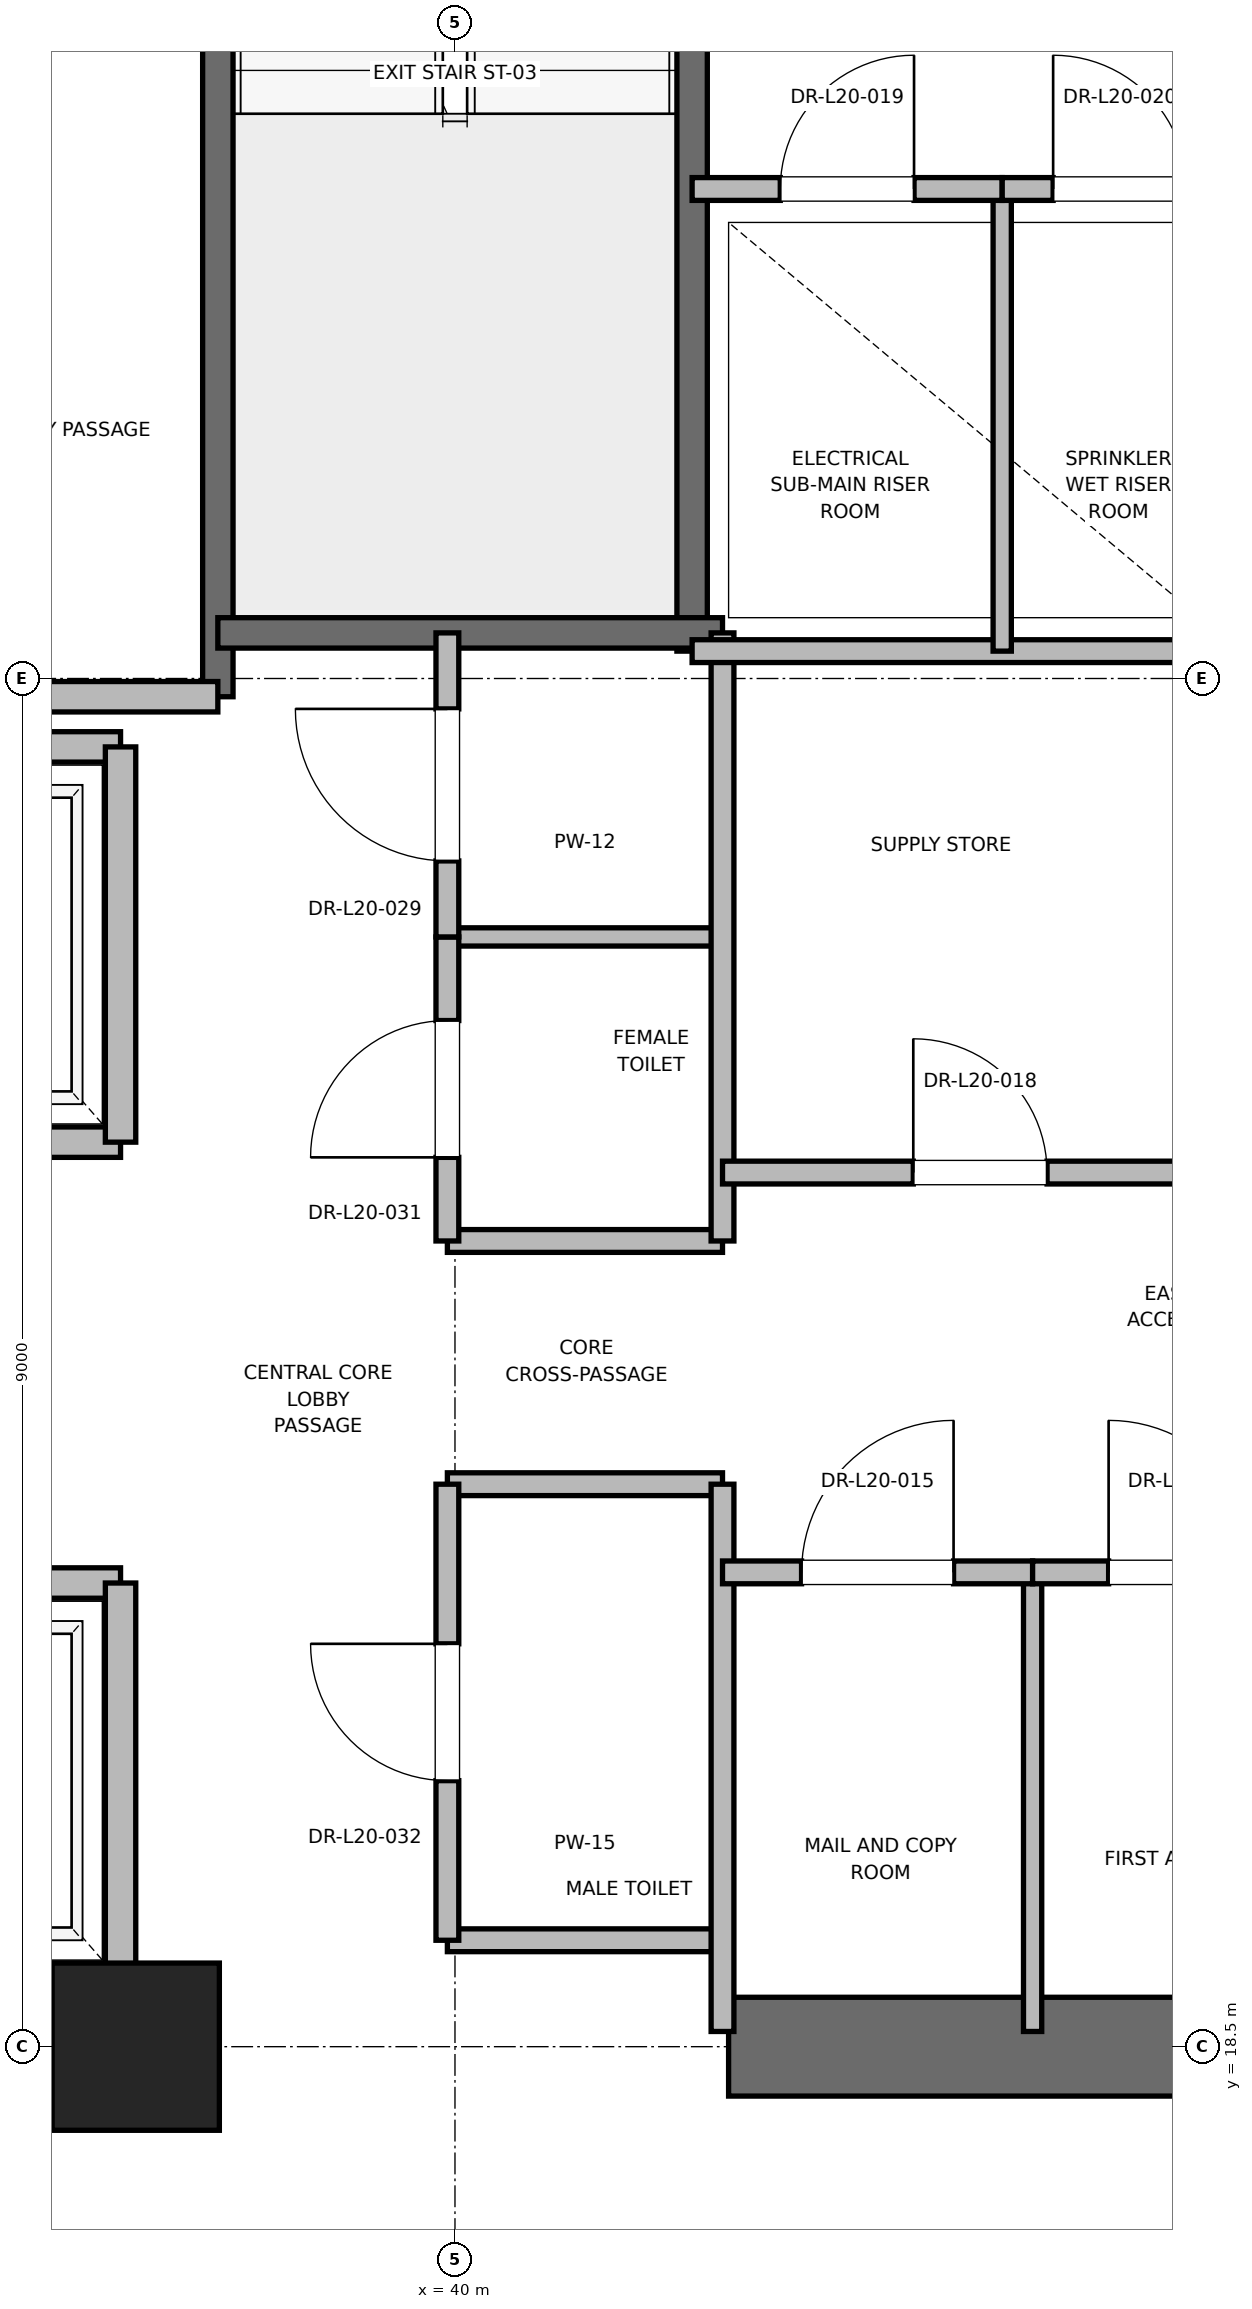
"""IFC4 building model, lengths in metres.
Left out: names, types, materials, properties, quantities, classifications, styles, units other than length and angle.
Written with IfcOpenShell. Run it as: python <this file> out.ifc"""

import sys

from ifc_helpers import new_model, si_unit, direction, frame, frame_2d, origin, origin_2d, place, context, subcontext, project, spatial, rectangle, extrude, element, fill, save


model = new_model("IFC4")
c1 = context("Model", 3, precision=1e-05, world=origin(), true_north=direction((0.0, 1.0)))
c2 = subcontext(c1, "Body", "Model", "MODEL_VIEW")
j1 = project(units=[si_unit("LENGTHUNIT", "METRE"), si_unit("PLANEANGLEUNIT", "RADIAN")], contexts=[c1])
p1 = place(None, origin())
s1 = spatial("IfcSite", under=j1, at=p1, CompositionType="ELEMENT")
p2 = place(p1, origin())
s2 = spatial("IfcBuilding", under=s1, at=p2, CompositionType="ELEMENT")
p3 = place(p2, frame((0.0, 0.0, 87.6)))
s3 = spatial("IfcBuildingStorey", under=s2, at=p3, CompositionType="ELEMENT", Elevation=87.6)
p4 = place(p3, frame((37.9, 18.5, 0.0), z_axis=(0.0, 0.0, 1.0), x_axis=(1.0, 0.0, 0.0)))
e1 = element("IfcColumn", 1, at=p4, inside=s3, PredefinedType="PILASTER", context=c2, shape_type="SweptSolid", body=[
    extrude(rectangle(XDim=1.1, YDim=1.1, at=origin_2d()), origin(), (0.0, 0.0, 1.0), 4.0),
])
for number, where, z_axis, x_axis in (
    (2, (29.0, 18.5, 0.0), (0.0, 0.0, 1.0), (1.0, 0.0, 0.0)),
    (3, (41.8, 18.5, 0.0), (0.0, 0.0, 1.0), (1.0, 0.0, 0.0)),
):
    element("IfcWall", number, at=place(p3, frame(where, z_axis=z_axis, x_axis=x_axis)), inside=s3, PredefinedType="SHEAR", context=c2, shape_type="SweptSolid", body=[
        extrude(rectangle(XDim=9.2, YDim=0.65, at=frame_2d((4.6, 0.0))), origin(), (0.0, 0.0, 1.0), 3.76),
    ])
p5 = place(p3, frame((38.44, 27.38, 0.0), z_axis=(0.0, 0.0, 1.0), x_axis=(0.0, 1.0, 0.0)))
e4 = element("IfcWall", 4, at=p5, inside=s3, PredefinedType="SOLIDWALL", context=c2, shape_type="SweptSolid", body=[
    extrude(rectangle(XDim=8.87, YDim=0.2, at=frame_2d((4.435, 0.0))), origin(), (0.0, 0.0, 1.0), 3.76),
])
p6 = place(p3, frame((41.56, 27.68, 0.0), z_axis=(0.0, 0.0, 1.0), x_axis=(0.0, 1.0, 0.0)))
e5 = element("IfcWall", 5, at=p6, inside=s3, PredefinedType="SOLIDWALL", context=c2, shape_type="SweptSolid", body=[
    extrude(rectangle(XDim=8.57, YDim=0.2, at=frame_2d((4.285, 0.0))), origin(), (0.0, 0.0, 1.0), 3.76),
])
p7 = place(p3, frame((38.44, 27.8, 0.0), z_axis=(0.0, 0.0, 1.0), x_axis=(1.0, 0.0, 0.0)))
e6 = element("IfcWall", 6, at=p7, inside=s3, PredefinedType="SOLIDWALL", context=c2, shape_type="SweptSolid", body=[
    extrude(rectangle(XDim=3.32, YDim=0.2, at=frame_2d((1.66, 0.0))), origin(), (0.0, 0.0, 1.0), 3.76),
])
p8 = place(p3, frame((32.82, 27.38, 0.0), z_axis=(0.0, 0.0, 1.0), x_axis=(1.0, 0.0, 0.0)))
e7 = element("IfcWall", 7, at=p8, inside=s3, PredefinedType="PARTITIONING", context=c2, shape_type="SweptSolid", body=[
    extrude(rectangle(XDim=5.62, YDim=0.2, at=frame_2d((2.81, 0.0))), origin(), (0.0, 0.0, 1.0), 3.76),
])
p9 = place(p3, frame((35.5, 18.95, 0.0), z_axis=(0.0, 0.0, 1.0), x_axis=(1.0, 0.0, 0.0)))
e8 = element("IfcWall", 8, at=p9, inside=s3, PredefinedType="SOLIDWALL", context=c2, shape_type="SweptSolid", body=[
    extrude(rectangle(XDim=2.3, YDim=0.2, at=frame_2d((1.15, 0.0))), origin(), (0.0, 0.0, 1.0), 2.54),
])
p10 = place(p3, frame((37.8, 21.55, 0.0), z_axis=(0.0, 0.0, 1.0), x_axis=(-1.0, 0.0, 0.0)))
e9 = element("IfcWall", 9, at=p10, inside=s3, PredefinedType="SOLIDWALL", context=c2, shape_type="SweptSolid", body=[
    extrude(rectangle(XDim=2.3, YDim=0.2, at=frame_2d((1.15, 0.0))), origin(), (0.0, 0.0, 1.0), 3.76),
])
p11 = place(p10, frame((0.6, 0.0, 0.0)))
e10 = element("IfcOpeningElement", 10, at=p11, cuts=e9, PredefinedType="OPENING", context=c2, shape_type="SweptSolid", body=[
    extrude(rectangle(XDim=1.1, YDim=2.2, at=frame_2d((0.55, 1.1))), frame((0.0, 0.1, 0.0), z_axis=(0.0, -1.0, 0.0), x_axis=(1.0, 0.0, 0.0)), (0.0, 0.0, 1.0), 0.2),
])
p12 = place(p3, frame((37.8, 18.95, 0.0), z_axis=(0.0, 0.0, 1.0), x_axis=(0.0, 1.0, 0.0)))
e11 = element("IfcWall", 11, at=p12, inside=s3, PredefinedType="SOLIDWALL", context=c2, shape_type="SweptSolid", body=[
    extrude(rectangle(XDim=2.6, YDim=0.2, at=frame_2d((1.3, 0.0))), origin(), (0.0, 0.0, 1.0), 2.54),
])
p13 = place(p3, frame((35.5, 24.45, 0.0), z_axis=(0.0, 0.0, 1.0), x_axis=(1.0, 0.0, 0.0)))
e12 = element("IfcWall", 12, at=p13, inside=s3, PredefinedType="SOLIDWALL", context=c2, shape_type="SweptSolid", body=[
    extrude(rectangle(XDim=2.3, YDim=0.2, at=frame_2d((1.15, 0.0))), origin(), (0.0, 0.0, 1.0), 3.76),
])
p14 = place(p13, frame((0.6, 0.0, 0.0)))
e13 = element("IfcOpeningElement", 13, at=p14, cuts=e12, PredefinedType="OPENING", context=c2, shape_type="SweptSolid", body=[
    extrude(rectangle(XDim=1.1, YDim=2.2, at=frame_2d((0.55, 1.1))), frame((0.0, 0.1, 0.0), z_axis=(0.0, -1.0, 0.0), x_axis=(1.0, 0.0, 0.0)), (0.0, 0.0, 1.0), 0.2),
])
p15 = place(p3, frame((37.8, 27.05, 0.0), z_axis=(0.0, 0.0, 1.0), x_axis=(-1.0, 0.0, 0.0)))
e14 = element("IfcWall", 14, at=p15, inside=s3, PredefinedType="SOLIDWALL", context=c2, shape_type="SweptSolid", body=[
    extrude(rectangle(XDim=2.3, YDim=0.2, at=frame_2d((1.15, 0.0))), origin(), (0.0, 0.0, 1.0), 3.76),
])
p16 = place(p3, frame((37.8, 24.45, 0.0), z_axis=(0.0, 0.0, 1.0), x_axis=(0.0, 1.0, 0.0)))
e15 = element("IfcWall", 15, at=p16, inside=s3, PredefinedType="SOLIDWALL", context=c2, shape_type="SweptSolid", body=[
    extrude(rectangle(XDim=2.6, YDim=0.2, at=frame_2d((1.3, 0.0))), origin(), (0.0, 0.0, 1.0), 3.76),
])
for number, where, z_axis, x_axis in (
    (16, (39.95, 19.2, 0.0), (0.0, 0.0, 1.0), (1.0, 0.0, 0.0)),
    (17, (39.95, 22.2, 0.0), (0.0, 0.0, 1.0), (1.0, 0.0, 0.0)),
    (18, (39.95, 23.8, 0.0), (0.0, 0.0, 1.0), (1.0, 0.0, 0.0)),
):
    element("IfcWall", number, at=place(p3, frame(where, z_axis=z_axis, x_axis=x_axis)), inside=s3, PredefinedType="PARTITIONING", context=c2, shape_type="SweptSolid", body=[
        extrude(rectangle(XDim=1.81, YDim=0.15, at=frame_2d((0.905, 0.0))), origin(), (0.0, 0.0, 1.0), 2.85),
    ])
p17 = place(p3, frame((39.95, 25.8, 0.0), z_axis=(0.0, 0.0, 1.0), x_axis=(1.0, 0.0, 0.0)))
e19 = element("IfcWall", 19, at=p17, inside=s3, PredefinedType="PARTITIONING", context=c2, shape_type="SweptSolid", body=[
    extrude(rectangle(XDim=1.81, YDim=0.12, at=frame_2d((0.905, 0.0))), origin(), (0.0, 0.0, 1.0), 2.85),
])
p18 = place(p3, frame((41.76, 18.6, 0.0), z_axis=(0.0, 0.0, 1.0), x_axis=(0.0, 1.0, 0.0)))
e20 = element("IfcWall", 20, at=p18, inside=s3, PredefinedType="PARTITIONING", context=c2, shape_type="SweptSolid", body=[
    extrude(rectangle(XDim=3.6, YDim=0.15, at=frame_2d((1.8, 0.0))), origin(), (0.0, 0.0, 1.0), 2.54),
])
p19 = place(p3, frame((41.76, 23.8, 0.0), z_axis=(0.0, 0.0, 1.0), x_axis=(0.0, 1.0, 0.0)))
e21 = element("IfcWall", 21, at=p19, inside=s3, PredefinedType="PARTITIONING", context=c2, shape_type="SweptSolid", body=[
    extrude(rectangle(XDim=4.0, YDim=0.15, at=frame_2d((2.0, 0.0))), origin(), (0.0, 0.0, 1.0), 2.85),
])
p20 = place(p3, frame((39.95, 19.2, 0.0), z_axis=(0.0, 0.0, 1.0), x_axis=(0.0, 1.0, 0.0)))
e22 = element("IfcWall", 22, at=p20, inside=s3, PredefinedType="PARTITIONING", context=c2, shape_type="SweptSolid", body=[
    extrude(rectangle(XDim=3.0, YDim=0.15, at=frame_2d((1.5, 0.0))), origin(), (0.0, 0.0, 1.0), 2.85),
])
p21 = place(p20, frame((1.05, 0.0, 0.0)))
e23 = element("IfcOpeningElement", 23, at=p21, cuts=e22, PredefinedType="OPENING", context=c2, shape_type="SweptSolid", body=[
    extrude(rectangle(XDim=0.9, YDim=2.1, at=frame_2d((0.45, 1.05))), frame((0.0, 0.075, 0.0), z_axis=(0.0, -1.0, 0.0), x_axis=(1.0, 0.0, 0.0)), (0.0, 0.0, 1.0), 0.15),
])
p22 = place(p3, frame((39.95, 23.8, 0.0), z_axis=(0.0, 0.0, 1.0), x_axis=(0.0, 1.0, 0.0)))
e24 = element("IfcWall", 24, at=p22, inside=s3, PredefinedType="PARTITIONING", context=c2, shape_type="SweptSolid", body=[
    extrude(rectangle(XDim=2.0, YDim=0.15, at=frame_2d((1.0, 0.0))), origin(), (0.0, 0.0, 1.0), 2.85),
])
p23 = place(p22, frame((0.55, 0.0, 0.0)))
e25 = element("IfcOpeningElement", 25, at=p23, cuts=e24, PredefinedType="OPENING", context=c2, shape_type="SweptSolid", body=[
    extrude(rectangle(XDim=0.9, YDim=2.1, at=frame_2d((0.45, 1.05))), frame((0.0, 0.075, 0.0), z_axis=(0.0, -1.0, 0.0), x_axis=(1.0, 0.0, 0.0)), (0.0, 0.0, 1.0), 0.15),
])
p24 = place(p3, frame((39.95, 25.8, 0.0), z_axis=(0.0, 0.0, 1.0), x_axis=(0.0, 1.0, 0.0)))
e26 = element("IfcWall", 26, at=p24, inside=s3, PredefinedType="PARTITIONING", context=c2, shape_type="SweptSolid", body=[
    extrude(rectangle(XDim=2.0, YDim=0.15, at=frame_2d((1.0, 0.0))), origin(), (0.0, 0.0, 1.0), 2.85),
])
p25 = place(p24, frame((0.5, 0.0, 0.0)))
e27 = element("IfcOpeningElement", 27, at=p25, cuts=e26, PredefinedType="OPENING", context=c2, shape_type="SweptSolid", body=[
    extrude(rectangle(XDim=1.0, YDim=2.15, at=frame_2d((0.5, 1.075))), frame((0.0, 0.075, 0.0), z_axis=(0.0, -1.0, 0.0), x_axis=(1.0, 0.0, 0.0)), (0.0, 0.0, 1.0), 0.15),
])
p26 = place(p3, frame((41.56, 27.68, 0.0), z_axis=(0.0, 0.0, 1.0), x_axis=(1.0, 0.0, 0.0)))
e28 = element("IfcWall", 28, at=p26, inside=s3, PredefinedType="PARTITIONING", context=c2, shape_type="SweptSolid", body=[
    extrude(rectangle(XDim=3.59, YDim=0.15, at=frame_2d((1.795, 0.0))), origin(), (0.0, 0.0, 1.0), 2.85),
])
p27 = place(p3, frame((43.8, 18.6, 0.0), z_axis=(0.0, 0.0, 1.0), x_axis=(0.0, 1.0, 0.0)))
e29 = element("IfcWall", 29, at=p27, inside=s3, PredefinedType="PARTITIONING", context=c2, shape_type="SweptSolid", body=[
    extrude(rectangle(XDim=3.02, YDim=0.12, at=frame_2d((1.51, 0.0))), origin(), (0.0, 0.0, 1.0), 2.85),
])
p28 = place(p3, frame((41.76, 21.62, 0.0), z_axis=(0.0, 0.0, 1.0), x_axis=(1.0, 0.0, 0.0)))
e30 = element("IfcWall", 30, at=p28, inside=s3, PredefinedType="PARTITIONING", context=c2, shape_type="SweptSolid", body=[
    extrude(rectangle(XDim=2.04, YDim=0.15, at=frame_2d((1.02, 0.0))), origin(), (0.0, 0.0, 1.0), 2.85),
])
p29 = place(p28, frame((0.52, 0.0, 0.0)))
e31 = element("IfcOpeningElement", 31, at=p29, cuts=e30, PredefinedType="OPENING", context=c2, shape_type="SweptSolid", body=[
    extrude(rectangle(XDim=1.0, YDim=2.15, at=frame_2d((0.5, 1.075))), frame((0.0, 0.075, 0.0), z_axis=(0.0, -1.0, 0.0), x_axis=(1.0, 0.0, 0.0)), (0.0, 0.0, 1.0), 0.15),
])
p30 = place(p3, frame((43.8, 21.62, 0.0), z_axis=(0.0, 0.0, 1.0), x_axis=(1.0, 0.0, 0.0)))
e32 = element("IfcWall", 32, at=p30, inside=s3, PredefinedType="PARTITIONING", context=c2, shape_type="SweptSolid", body=[
    extrude(rectangle(XDim=2.0, YDim=0.15, at=frame_2d((1.0, 0.0))), origin(), (0.0, 0.0, 1.0), 2.85),
])
p31 = place(p30, frame((0.5, 0.0, 0.0)))
e33 = element("IfcOpeningElement", 33, at=p31, cuts=e32, PredefinedType="OPENING", context=c2, shape_type="SweptSolid", body=[
    extrude(rectangle(XDim=1.0, YDim=2.15, at=frame_2d((0.5, 1.075))), frame((0.0, 0.075, 0.0), z_axis=(0.0, -1.0, 0.0), x_axis=(1.0, 0.0, 0.0)), (0.0, 0.0, 1.0), 0.15),
])
p32 = place(p3, frame((41.76, 24.25, 0.0), z_axis=(0.0, 0.0, 1.0), x_axis=(1.0, 0.0, 0.0)))
e34 = element("IfcWall", 34, at=p32, inside=s3, PredefinedType="PARTITIONING", context=c2, shape_type="SweptSolid", body=[
    extrude(rectangle(XDim=3.39, YDim=0.15, at=frame_2d((1.695, 0.0))), origin(), (0.0, 0.0, 1.0), 2.85),
])
p33 = place(p32, frame((1.255, 0.0, 0.0)))
e35 = element("IfcOpeningElement", 35, at=p33, cuts=e34, PredefinedType="OPENING", context=c2, shape_type="SweptSolid", body=[
    extrude(rectangle(XDim=0.88, YDim=2.1, at=frame_2d((0.44, 1.05))), frame((0.0, 0.075, 0.0), z_axis=(0.0, -1.0, 0.0), x_axis=(1.0, 0.0, 0.0)), (0.0, 0.0, 1.0), 0.15),
])
p34 = place(p3, frame((43.6, 27.68, 0.0), z_axis=(0.0, 0.0, 1.0), x_axis=(0.0, 1.0, 0.0)))
e36 = element("IfcWall", 36, at=p34, inside=s3, PredefinedType="PARTITIONING", context=c2, shape_type="SweptSolid", body=[
    extrude(rectangle(XDim=3.04, YDim=0.12, at=frame_2d((1.52, 0.0))), origin(), (0.0, 0.0, 1.0), 2.85),
])
p35 = place(p3, frame((41.56, 30.72, 0.0), z_axis=(0.0, 0.0, 1.0), x_axis=(1.0, 0.0, 0.0)))
e37 = element("IfcWall", 37, at=p35, inside=s3, PredefinedType="PARTITIONING", context=c2, shape_type="SweptSolid", body=[
    extrude(rectangle(XDim=2.04, YDim=0.15, at=frame_2d((1.02, 0.0))), origin(), (0.0, 0.0, 1.0), 2.85),
])
p36 = place(p35, frame((0.58, 0.0, 0.0)))
e38 = element("IfcOpeningElement", 38, at=p36, cuts=e37, PredefinedType="OPENING", context=c2, shape_type="SweptSolid", body=[
    extrude(rectangle(XDim=0.88, YDim=2.1, at=frame_2d((0.44, 1.05))), frame((0.0, 0.075, 0.0), z_axis=(0.0, -1.0, 0.0), x_axis=(1.0, 0.0, 0.0)), (0.0, 0.0, 1.0), 0.15),
])
p37 = place(p3, frame((43.6, 30.72, 0.0), z_axis=(0.0, 0.0, 1.0), x_axis=(1.0, 0.0, 0.0)))
e39 = element("IfcWall", 39, at=p37, inside=s3, PredefinedType="PARTITIONING", context=c2, shape_type="SweptSolid", body=[
    extrude(rectangle(XDim=1.55, YDim=0.15, at=frame_2d((0.775, 0.0))), origin(), (0.0, 0.0, 1.0), 2.85),
])
p38 = place(p37, frame((0.335, 0.0, 0.0)))
e40 = element("IfcOpeningElement", 40, at=p38, cuts=e39, PredefinedType="OPENING", context=c2, shape_type="SweptSolid", body=[
    extrude(rectangle(XDim=0.88, YDim=2.1, at=frame_2d((0.44, 1.05))), frame((0.0, 0.075, 0.0), z_axis=(0.0, -1.0, 0.0), x_axis=(1.0, 0.0, 0.0)), (0.0, 0.0, 1.0), 0.15),
])
p39 = place(p21, origin())
e41 = element("IfcDoor", 41, at=p39, inside=s3, OperationType="SINGLE_SWING_RIGHT", PredefinedType="DOOR", context=c2, shape_type="SweptSolid", body=[
    extrude(rectangle(XDim=0.9, YDim=2.1, at=frame_2d((0.45, 1.05))), frame((0.0, 0.025, 0.0), z_axis=(0.0, -1.0, 0.0), x_axis=(1.0, 0.0, 0.0)), (0.0, 0.0, 1.0), 0.05),
])
fill(e23, e41)
p40 = place(p23, origin())
e42 = element("IfcDoor", 42, at=p40, inside=s3, OperationType="SINGLE_SWING_LEFT", PredefinedType="DOOR", context=c2, shape_type="SweptSolid", body=[
    extrude(rectangle(XDim=0.9, YDim=2.1, at=frame_2d((0.45, 1.05))), frame((0.0, 0.025, 0.0), z_axis=(0.0, -1.0, 0.0), x_axis=(1.0, 0.0, 0.0)), (0.0, 0.0, 1.0), 0.05),
])
fill(e25, e42)
p41 = place(p25, origin())
e43 = element("IfcDoor", 43, at=p41, inside=s3, OperationType="SINGLE_SWING_RIGHT", PredefinedType="DOOR", context=c2, shape_type="SweptSolid", body=[
    extrude(rectangle(XDim=1.0, YDim=2.15, at=frame_2d((0.5, 1.075))), frame((0.0, 0.025, 0.0), z_axis=(0.0, -1.0, 0.0), x_axis=(1.0, 0.0, 0.0)), (0.0, 0.0, 1.0), 0.05),
])
fill(e27, e43)
p42 = place(p29, origin())
e44 = element("IfcDoor", 44, at=p42, inside=s3, OperationType="SINGLE_SWING_RIGHT", PredefinedType="DOOR", context=c2, shape_type="SweptSolid", body=[
    extrude(rectangle(XDim=1.0, YDim=2.15, at=frame_2d((0.5, 1.075))), frame((0.0, 0.025, 0.0), z_axis=(0.0, -1.0, 0.0), x_axis=(1.0, 0.0, 0.0)), (0.0, 0.0, 1.0), 0.05),
])
fill(e31, e44)
p43 = place(p31, origin())
e45 = element("IfcDoor", 45, at=p43, inside=s3, OperationType="SINGLE_SWING_LEFT", PredefinedType="DOOR", context=c2, shape_type="SweptSolid", body=[
    extrude(rectangle(XDim=1.0, YDim=2.15, at=frame_2d((0.5, 1.075))), frame((0.0, 0.025, 0.0), z_axis=(0.0, -1.0, 0.0), x_axis=(1.0, 0.0, 0.0)), (0.0, 0.0, 1.0), 0.05),
])
fill(e33, e45)
p44 = place(p33, origin())
e46 = element("IfcDoor", 46, at=p44, inside=s3, OperationType="SINGLE_SWING_LEFT", PredefinedType="DOOR", context=c2, shape_type="SweptSolid", body=[
    extrude(rectangle(XDim=0.88, YDim=2.1, at=frame_2d((0.44, 1.05))), frame((0.0, 0.025, 0.0), z_axis=(0.0, -1.0, 0.0), x_axis=(1.0, 0.0, 0.0)), (0.0, 0.0, 1.0), 0.05),
])
fill(e35, e46)
p45 = place(p36, origin())
e47 = element("IfcDoor", 47, at=p45, inside=s3, OperationType="SINGLE_SWING_RIGHT", PredefinedType="DOOR", context=c2, shape_type="SweptSolid", body=[
    extrude(rectangle(XDim=0.88, YDim=2.1, at=frame_2d((0.44, 1.05))), frame((0.0, 0.025, 0.0), z_axis=(0.0, -1.0, 0.0), x_axis=(1.0, 0.0, 0.0)), (0.0, 0.0, 1.0), 0.05),
])
fill(e38, e47)
p46 = place(p38, origin())
e48 = element("IfcDoor", 48, at=p46, inside=s3, OperationType="SINGLE_SWING_LEFT", PredefinedType="DOOR", context=c2, shape_type="SweptSolid", body=[
    extrude(rectangle(XDim=0.88, YDim=2.1, at=frame_2d((0.44, 1.05))), frame((0.0, 0.025, 0.0), z_axis=(0.0, -1.0, 0.0), x_axis=(1.0, 0.0, 0.0)), (0.0, 0.0, 1.0), 0.05),
])
fill(e40, e48)
save(model, sys.argv[1])
